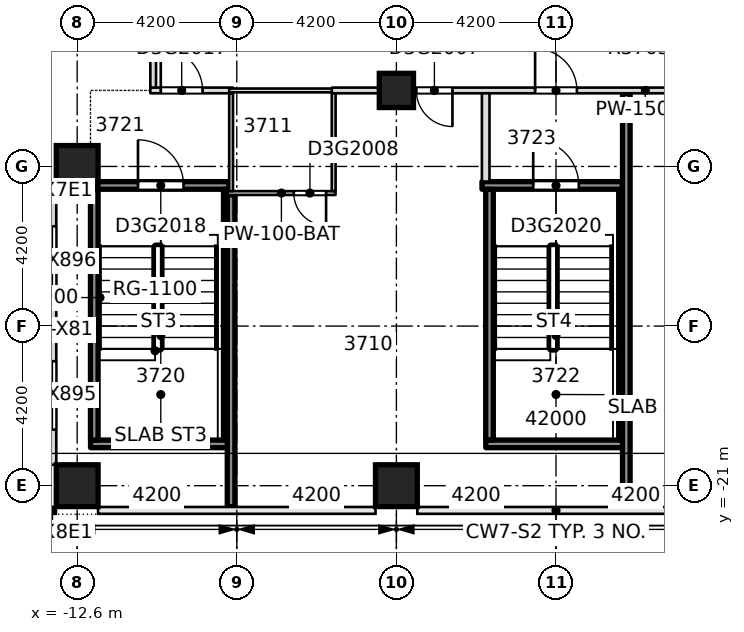
"""IFC4 building model, lengths in metres.
Left out: names, types, materials, properties, quantities, classifications, styles, units other than length and angle.
Written with IfcOpenShell. Run it as: python <this file> out.ifc"""

import sys

from ifc_helpers import new_model, si_unit, direction, frame, frame_2d, origin, origin_2d, place, context, subcontext, project, spatial, rectangle, extrude, element, fill, save


model = new_model("IFC4")
c1 = context("Model", 3, precision=1e-05, world=origin(), true_north=direction((0.0, 1.0)))
c2 = subcontext(c1, "Body", "Model", "MODEL_VIEW")
j1 = project(units=[si_unit("LENGTHUNIT", "METRE"), si_unit("PLANEANGLEUNIT", "RADIAN")], contexts=[c1])
p1 = place(None, origin())
s1 = spatial("IfcSite", under=j1, at=p1, CompositionType="ELEMENT")
p2 = place(p1, origin())
s2 = spatial("IfcBuilding", under=s1, at=p2, CompositionType="ELEMENT")
p3 = place(p2, frame((0.0, 0.0, 146.9)))
s3 = spatial("IfcBuildingStorey", under=s2, at=p3, CompositionType="ELEMENT", Elevation=146.9)
for number, where, z_axis, x_axis in (
    (1, (-12.6, -21.0, -0.4), (0.0, 0.0, 1.0), (1.0, 0.0, 0.0)),
    (2, (-4.2, -21.0, -0.4), (0.0, 0.0, 1.0), (1.0, 0.0, 0.0)),
    (3, (-12.6, -12.6, -0.4), (0.0, 0.0, 1.0), (1.0, 0.0, 0.0)),
):
    element("IfcColumn", number, at=place(p3, frame(where, z_axis=z_axis, x_axis=x_axis)), inside=s3, PredefinedType="COLUMN", context=c2, shape_type="SweptSolid", body=[
        extrude(rectangle(XDim=1.1, YDim=1.1, at=origin_2d()), origin(), (0.0, 0.0, 1.0), 3.45),
    ])
p4 = place(p3, frame((-4.2, -10.6, -0.4), z_axis=(0.0, 0.0, 1.0), x_axis=(1.0, 0.0, 0.0)))
e4 = element("IfcColumn", 4, at=p4, inside=s3, PredefinedType="COLUMN", context=c2, shape_type="SweptSolid", body=[
    extrude(rectangle(XDim=0.9, YDim=0.9, at=origin_2d()), origin(), (0.0, 0.0, 1.0), 3.45),
])
p5 = place(p3, frame((-12.248, -19.9, 0.0), z_axis=(0.0, 0.0, 1.0), x_axis=(1.0, 0.0, 0.0)))
e5 = element("IfcWall", 5, at=p5, inside=s3, PredefinedType="SOLIDWALL", context=c2, shape_type="SweptSolid", body=[
    extrude(rectangle(XDim=3.696, YDim=0.2, at=frame_2d((1.848, 0.0))), origin(), (0.0, 0.0, 1.0), 3.05),
])
p6 = place(p3, frame((-1.848, -19.9, 0.0), z_axis=(0.0, 0.0, 1.0), x_axis=(1.0, 0.0, 0.0)))
e6 = element("IfcWall", 6, at=p6, inside=s3, PredefinedType="SOLIDWALL", context=c2, shape_type="SweptSolid", body=[
    extrude(rectangle(XDim=3.696, YDim=0.2, at=frame_2d((1.848, 0.0))), origin(), (0.0, 0.0, 1.0), 3.05),
])
p7 = place(p3, frame((-8.65, -13.3, 0.0), z_axis=(0.0, 0.0, 1.0), x_axis=(1.0, 0.0, 0.0)))
e7 = element("IfcWall", 7, at=p7, inside=s3, PredefinedType="PARTITIONING", context=c2, shape_type="SweptSolid", body=[
    extrude(rectangle(XDim=2.848, YDim=0.1, at=frame_2d((1.424, 0.0))), origin(), (0.0, 0.0, 1.0), 3.05),
])
p8 = place(p7, frame((1.75, 0.0, 0.0)))
e8 = element("IfcOpeningElement", 8, at=p8, cuts=e7, PredefinedType="OPENING", context=c2, shape_type="SweptSolid", body=[
    extrude(rectangle(XDim=0.85, YDim=2.1, at=frame_2d((0.425, 1.05))), frame((0.0, 0.06, 0.0), z_axis=(0.0, -1.0, 0.0), x_axis=(1.0, 0.0, 0.0)), (0.0, 0.0, 1.0), 0.12),
])
p9 = place(p3, frame((-12.348, -13.1, 0.0), z_axis=(0.0, 0.0, 1.0), x_axis=(1.0, 0.0, 0.0)))
e9 = element("IfcWall", 9, at=p9, inside=s3, PredefinedType="SOLIDWALL", context=c2, shape_type="SweptSolid", body=[
    extrude(rectangle(XDim=3.746, YDim=0.2, at=frame_2d((1.873, 0.0))), origin(), (0.0, 0.0, 1.0), 3.05),
])
p10 = place(p9, frame((1.348, 0.0, 0.0)))
e10 = element("IfcOpeningElement", 10, at=p10, cuts=e9, PredefinedType="OPENING", context=c2, shape_type="SweptSolid", body=[
    extrude(rectangle(XDim=1.2, YDim=2.1, at=frame_2d((0.6, 1.05))), frame((0.0, 0.11, 0.0), z_axis=(0.0, -1.0, 0.0), x_axis=(1.0, 0.0, 0.0)), (0.0, 0.0, 1.0), 0.22),
])
p11 = place(p3, frame((-1.948, -13.1, 0.0), z_axis=(0.0, 0.0, 1.0), x_axis=(1.0, 0.0, 0.0)))
e11 = element("IfcWall", 11, at=p11, inside=s3, PredefinedType="SOLIDWALL", context=c2, shape_type="SweptSolid", body=[
    extrude(rectangle(XDim=3.696, YDim=0.2, at=frame_2d((1.848, 0.0))), origin(), (0.0, 0.0, 1.0), 3.05),
])
p12 = place(p11, frame((1.348, 0.0, 0.0)))
e12 = element("IfcOpeningElement", 12, at=p12, cuts=e11, PredefinedType="OPENING", context=c2, shape_type="SweptSolid", body=[
    extrude(rectangle(XDim=1.2, YDim=2.1, at=frame_2d((0.6, 1.05))), frame((0.0, 0.11, 0.0), z_axis=(0.0, -1.0, 0.0), x_axis=(1.0, 0.0, 0.0)), (0.0, 0.0, 1.0), 0.22),
])
p13 = place(p3, frame((-10.675, -10.6, 0.0), z_axis=(0.0, 0.0, 1.0), x_axis=(1.0, 0.0, 0.0)))
e13 = element("IfcWall", 13, at=p13, inside=s3, PredefinedType="PARTITIONING", context=c2, shape_type="SweptSolid", body=[
    extrude(rectangle(XDim=2.175, YDim=0.15, at=frame_2d((1.087, 0.0))), origin(), (0.0, 0.0, 1.0), 3.05),
])
p14 = place(p13, frame((0.275, 0.0, 0.0)))
e14 = element("IfcOpeningElement", 14, at=p14, cuts=e13, PredefinedType="OPENING", context=c2, shape_type="SweptSolid", body=[
    extrude(rectangle(XDim=1.1, YDim=2.1, at=frame_2d((0.55, 1.05))), frame((0.0, 0.085, 0.0), z_axis=(0.0, -1.0, 0.0), x_axis=(1.0, 0.0, 0.0)), (0.0, 0.0, 1.0), 0.17),
])
p15 = place(p3, frame((-8.6, -10.6, 0.0), z_axis=(0.0, 0.0, 1.0), x_axis=(1.0, 0.0, 0.0)))
e15 = element("IfcWall", 15, at=p15, inside=s3, PredefinedType="PARTITIONING", context=c2, shape_type="SweptSolid", body=[
    extrude(rectangle(XDim=2.8, YDim=0.1, at=frame_2d((1.4, 0.0))), origin(), (0.0, 0.0, 1.0), 3.05),
])
p16 = place(p3, frame((-5.9, -10.6, 0.0), z_axis=(0.0, 0.0, 1.0), x_axis=(1.0, 0.0, 0.0)))
e16 = element("IfcWall", 16, at=p16, inside=s3, PredefinedType="PARTITIONING", context=c2, shape_type="SweptSolid", body=[
    extrude(rectangle(XDim=16.5, YDim=0.15, at=frame_2d((8.25, 0.0))), origin(), (0.0, 0.0, 1.0), 3.05),
])
p17 = place(p16, frame((2.225, 0.0, 0.0)))
e17 = element("IfcOpeningElement", 17, at=p17, cuts=e16, PredefinedType="OPENING", context=c2, shape_type="SweptSolid", body=[
    extrude(rectangle(XDim=0.95, YDim=2.1, at=frame_2d((0.475, 1.05))), frame((0.0, 0.085, 0.0), z_axis=(0.0, -1.0, 0.0), x_axis=(1.0, 0.0, 0.0)), (0.0, 0.0, 1.0), 0.17),
])
p18 = place(p16, frame((10.625, 0.0, 0.0)))
e18 = element("IfcOpeningElement", 18, at=p18, cuts=e16, PredefinedType="OPENING", context=c2, shape_type="SweptSolid", body=[
    extrude(rectangle(XDim=0.95, YDim=2.1, at=frame_2d((0.475, 1.05))), frame((0.0, 0.085, 0.0), z_axis=(0.0, -1.0, 0.0), x_axis=(1.0, 0.0, 0.0)), (0.0, 0.0, 1.0), 0.17),
])
p19 = place(p16, frame((5.35, 0.0, 0.0)))
e19 = element("IfcOpeningElement", 19, at=p19, cuts=e16, PredefinedType="OPENING", context=c2, shape_type="SweptSolid", body=[
    extrude(rectangle(XDim=1.1, YDim=2.1, at=frame_2d((0.55, 1.05))), frame((0.0, 0.085, 0.0), z_axis=(0.0, -1.0, 0.0), x_axis=(1.0, 0.0, 0.0)), (0.0, 0.0, 1.0), 0.17),
])
p20 = place(p16, frame((15.2, 0.0, 0.0)))
e20 = element("IfcOpeningElement", 20, at=p20, cuts=e16, PredefinedType="OPENING", context=c2, shape_type="SweptSolid", body=[
    extrude(rectangle(XDim=1.1, YDim=2.1, at=frame_2d((0.55, 1.05))), frame((0.0, 0.085, 0.0), z_axis=(0.0, -1.0, 0.0), x_axis=(1.0, 0.0, 0.0)), (0.0, 0.0, 1.0), 0.17),
])
p21 = place(p3, frame((-12.25, -12.998, 0.0), z_axis=(0.0, 0.0, 1.0), x_axis=(0.0, 1.0, 0.0)))
e21 = element("IfcWall", 21, at=p21, inside=s3, PredefinedType="PARTITIONING", context=c2, shape_type="SweptSolid", body=[
    extrude(rectangle(XDim=0.306, YDim=0.2, at=frame_2d((0.153, 0.0))), origin(), (0.0, 0.0, 1.0), 3.05),
])
p22 = place(p3, frame((-12.15, -19.798, 0.0), z_axis=(0.0, 0.0, 1.0), x_axis=(0.0, 1.0, 0.0)))
e22 = element("IfcWall", 22, at=p22, inside=s3, PredefinedType="SOLIDWALL", context=c2, shape_type="SweptSolid", body=[
    extrude(rectangle(XDim=6.596, YDim=0.2, at=frame_2d((3.298, 0.0))), origin(), (0.0, 0.0, 1.0), 3.05),
])
p23 = place(p3, frame((-10.6, -10.525, 0.0), z_axis=(0.0, 0.0, 1.0), x_axis=(0.0, 1.0, 0.0)))
e23 = element("IfcWall", 23, at=p23, inside=s3, PredefinedType="PARTITIONING", context=c2, shape_type="SweptSolid", body=[
    extrude(rectangle(XDim=13.875, YDim=0.15, at=frame_2d((6.938, 0.0))), origin(), (0.0, 0.0, 1.0), 3.05),
])
p24 = place(p23, frame((2.325, 0.0, 0.0)))
e24 = element("IfcOpeningElement", 24, at=p24, cuts=e23, PredefinedType="OPENING", context=c2, shape_type="SweptSolid", body=[
    extrude(rectangle(XDim=0.95, YDim=2.1, at=frame_2d((0.475, 1.05))), frame((0.0, 0.085, 0.0), z_axis=(0.0, -1.0, 0.0), x_axis=(1.0, 0.0, 0.0)), (0.0, 0.0, 1.0), 0.17),
])
p25 = place(p23, frame((9.975, 0.0, 0.0)))
e25 = element("IfcOpeningElement", 25, at=p25, cuts=e23, PredefinedType="OPENING", context=c2, shape_type="SweptSolid", body=[
    extrude(rectangle(XDim=1.1, YDim=2.1, at=frame_2d((0.55, 1.05))), frame((0.0, 0.085, 0.0), z_axis=(0.0, -1.0, 0.0), x_axis=(1.0, 0.0, 0.0)), (0.0, 0.0, 1.0), 0.17),
])
p26 = place(p23, frame((4.825, 0.0, 0.0)))
e26 = element("IfcOpeningElement", 26, at=p26, cuts=e23, PredefinedType="OPENING", context=c2, shape_type="SweptSolid", body=[
    extrude(rectangle(XDim=1.0, YDim=2.1, at=frame_2d((0.5, 1.05))), frame((0.0, 0.085, 0.0), z_axis=(0.0, -1.0, 0.0), x_axis=(1.0, 0.0, 0.0)), (0.0, 0.0, 1.0), 0.17),
])
p27 = place(p3, frame((-8.65, -19.798, 0.0), z_axis=(0.0, 0.0, 1.0), x_axis=(0.0, 1.0, 0.0)))
e27 = element("IfcWall", 27, at=p27, inside=s3, PredefinedType="SOLIDWALL", context=c2, shape_type="SweptSolid", body=[
    extrude(rectangle(XDim=6.596, YDim=0.2, at=frame_2d((3.298, 0.0))), origin(), (0.0, 0.0, 1.0), 3.05),
])
p28 = place(p3, frame((-8.55, -13.25, 0.0), z_axis=(0.0, 0.0, 1.0), x_axis=(0.0, 1.0, 0.0)))
e28 = element("IfcWall", 28, at=p28, inside=s3, PredefinedType="PARTITIONING", context=c2, shape_type="SweptSolid", body=[
    extrude(rectangle(XDim=2.575, YDim=0.1, at=frame_2d((1.288, 0.0))), origin(), (0.0, 0.0, 1.0), 3.05),
])
p29 = place(p3, frame((-5.85, -13.248, 0.0), z_axis=(0.0, 0.0, 1.0), x_axis=(0.0, 1.0, 0.0)))
e29 = element("IfcWall", 29, at=p29, inside=s3, PredefinedType="PARTITIONING", context=c2, shape_type="SweptSolid", body=[
    extrude(rectangle(XDim=2.573, YDim=0.1, at=frame_2d((1.287, 0.0))), origin(), (0.0, 0.0, 1.0), 3.05),
])
p30 = place(p3, frame((-1.85, -12.998, 0.0), z_axis=(0.0, 0.0, 1.0), x_axis=(0.0, 1.0, 0.0)))
e30 = element("IfcWall", 30, at=p30, inside=s3, PredefinedType="PARTITIONING", context=c2, shape_type="SweptSolid", body=[
    extrude(rectangle(XDim=2.323, YDim=0.2, at=frame_2d((1.162, 0.0))), origin(), (0.0, 0.0, 1.0), 3.05),
])
for number, where, z_axis, x_axis in (
    (31, (-1.75, -19.798, 0.0), (0.0, 0.0, 1.0), (0.0, 1.0, 0.0)),
    (32, (1.75, -19.798, 0.0), (0.0, 0.0, 1.0), (0.0, 1.0, 0.0)),
):
    element("IfcWall", number, at=place(p3, frame(where, z_axis=z_axis, x_axis=x_axis)), inside=s3, PredefinedType="SOLIDWALL", context=c2, shape_type="SweptSolid", body=[
        extrude(rectangle(XDim=6.596, YDim=0.2, at=frame_2d((3.298, 0.0))), origin(), (0.0, 0.0, 1.0), 3.05),
    ])
p31 = place(p3, frame((-13.25, -13.35, 0.0), z_axis=(0.0, 0.0, 1.0), x_axis=(0.0, -1.0, 0.0)))
e33 = element("IfcWall", 33, at=p31, inside=s3, PredefinedType="STANDARD", context=c2, shape_type="SweptSolid", body=[
    extrude(rectangle(XDim=7.1, YDim=0.2, at=frame_2d((3.55, 0.0))), origin(), (0.0, 0.0, 1.0), 3.05),
])
p32 = place(p31, frame((4.375, 0.0, 0.2)))
e34 = element("IfcOpeningElement", 34, at=p32, cuts=e33, PredefinedType="OPENING", context=c2, shape_type="SweptSolid", body=[
    extrude(rectangle(XDim=1.8, YDim=2.65, at=frame_2d((0.9, 1.325))), frame((0.0, 0.11, 0.0), z_axis=(0.0, -1.0, 0.0), x_axis=(1.0, 0.0, 0.0)), (0.0, 0.0, 1.0), 0.22),
])
p33 = place(p31, frame((0.825, 0.0, 0.2)))
e35 = element("IfcOpeningElement", 35, at=p33, cuts=e33, PredefinedType="OPENING", context=c2, shape_type="SweptSolid", body=[
    extrude(rectangle(XDim=1.8, YDim=2.65, at=frame_2d((0.9, 1.325))), frame((0.0, 0.11, 0.0), z_axis=(0.0, -1.0, 0.0), x_axis=(1.0, 0.0, 0.0)), (0.0, 0.0, 1.0), 0.22),
])
p34 = place(p3, frame((1.85, -21.55, 0.0), z_axis=(0.0, 0.0, 1.0), x_axis=(0.0, 1.0, 0.0)))
e36 = element("IfcWall", 36, at=p34, inside=s3, PredefinedType="SOLIDWALL", context=c2, shape_type="SweptSolid", body=[
    extrude(rectangle(XDim=10.875, YDim=0.2, at=frame_2d((5.438, 0.0))), origin(), (0.0, 0.0, 1.0), 3.05),
])
p35 = place(p3, frame((-8.55, -21.55, 0.0), z_axis=(0.0, 0.0, 1.0), x_axis=(0.0, 1.0, 0.0)))
e37 = element("IfcWall", 37, at=p35, inside=s3, PredefinedType="SOLIDWALL", context=c2, shape_type="SweptSolid", body=[
    extrude(rectangle(XDim=8.2, YDim=0.2, at=frame_2d((4.1, 0.0))), origin(), (0.0, 0.0, 1.0), 3.05),
])
p36 = place(p17, origin())
e38 = element("IfcDoor", 38, at=p36, inside=s3, OperationType="SINGLE_SWING_LEFT", PredefinedType="DOOR", context=c2, shape_type="SweptSolid", body=[
    extrude(rectangle(XDim=0.95, YDim=2.1, at=frame_2d((0.475, 1.05))), frame((0.0, 0.025, 0.0), z_axis=(0.0, -1.0, 0.0), x_axis=(1.0, 0.0, 0.0)), (0.0, 0.0, 1.0), 0.05),
])
fill(e17, e38)
p37 = place(p8, origin())
e39 = element("IfcDoor", 39, at=p37, inside=s3, OperationType="SINGLE_SWING_RIGHT", PredefinedType="DOOR", context=c2, shape_type="SweptSolid", body=[
    extrude(rectangle(XDim=0.85, YDim=2.1, at=frame_2d((0.425, 1.05))), frame((0.0, 0.025, 0.0), z_axis=(0.0, -1.0, 0.0), x_axis=(1.0, 0.0, 0.0)), (0.0, 0.0, 1.0), 0.05),
])
fill(e8, e39)
p38 = place(p14, origin())
e40 = element("IfcDoor", 40, at=p38, inside=s3, OperationType="SINGLE_SWING_RIGHT", PredefinedType="DOOR", context=c2, shape_type="SweptSolid", body=[
    extrude(rectangle(XDim=1.1, YDim=2.1, at=frame_2d((0.55, 1.05))), frame((0.0, 0.025, 0.0), z_axis=(0.0, -1.0, 0.0), x_axis=(1.0, 0.0, 0.0)), (0.0, 0.0, 1.0), 0.05),
])
fill(e14, e40)
p39 = place(p10, origin())
e41 = element("IfcDoor", 41, at=p39, inside=s3, OperationType="SINGLE_SWING_RIGHT", PredefinedType="DOOR", context=c2, shape_type="SweptSolid", body=[
    extrude(rectangle(XDim=1.2, YDim=2.1, at=frame_2d((0.6, 1.05))), frame((0.0, 0.025, 0.0), z_axis=(0.0, -1.0, 0.0), x_axis=(1.0, 0.0, 0.0)), (0.0, 0.0, 1.0), 0.05),
])
fill(e10, e41)
p40 = place(p19, origin())
e42 = element("IfcDoor", 42, at=p40, inside=s3, OperationType="SINGLE_SWING_LEFT", PredefinedType="DOOR", context=c2, shape_type="SweptSolid", body=[
    extrude(rectangle(XDim=1.1, YDim=2.1, at=frame_2d((0.55, 1.05))), frame((0.0, 0.025, 0.0), z_axis=(0.0, -1.0, 0.0), x_axis=(1.0, 0.0, 0.0)), (0.0, 0.0, 1.0), 0.05),
])
fill(e19, e42)
p41 = place(p12, origin())
e43 = element("IfcDoor", 43, at=p41, inside=s3, OperationType="SINGLE_SWING_RIGHT", PredefinedType="DOOR", context=c2, shape_type="SweptSolid", body=[
    extrude(rectangle(XDim=1.2, YDim=2.1, at=frame_2d((0.6, 1.05))), frame((0.0, 0.025, 0.0), z_axis=(0.0, -1.0, 0.0), x_axis=(1.0, 0.0, 0.0)), (0.0, 0.0, 1.0), 0.05),
])
fill(e12, e43)
p42 = place(p32, origin())
e44 = element("IfcWindow", 44, at=p42, inside=s3, PartitioningType="SINGLE_PANEL", PredefinedType="WINDOW", context=c2, shape_type="SweptSolid", body=[
    extrude(rectangle(XDim=1.8, YDim=2.65, at=frame_2d((0.9, 1.325))), frame((0.0, 0.03, 0.0), z_axis=(0.0, -1.0, 0.0), x_axis=(1.0, 0.0, 0.0)), (0.0, 0.0, 1.0), 0.06),
])
fill(e34, e44)
p43 = place(p33, origin())
e45 = element("IfcWindow", 45, at=p43, inside=s3, PartitioningType="SINGLE_PANEL", PredefinedType="WINDOW", context=c2, shape_type="SweptSolid", body=[
    extrude(rectangle(XDim=1.8, YDim=2.65, at=frame_2d((0.9, 1.325))), frame((0.0, 0.03, 0.0), z_axis=(0.0, -1.0, 0.0), x_axis=(1.0, 0.0, 0.0)), (0.0, 0.0, 1.0), 0.06),
])
fill(e35, e45)
save(model, sys.argv[1])
